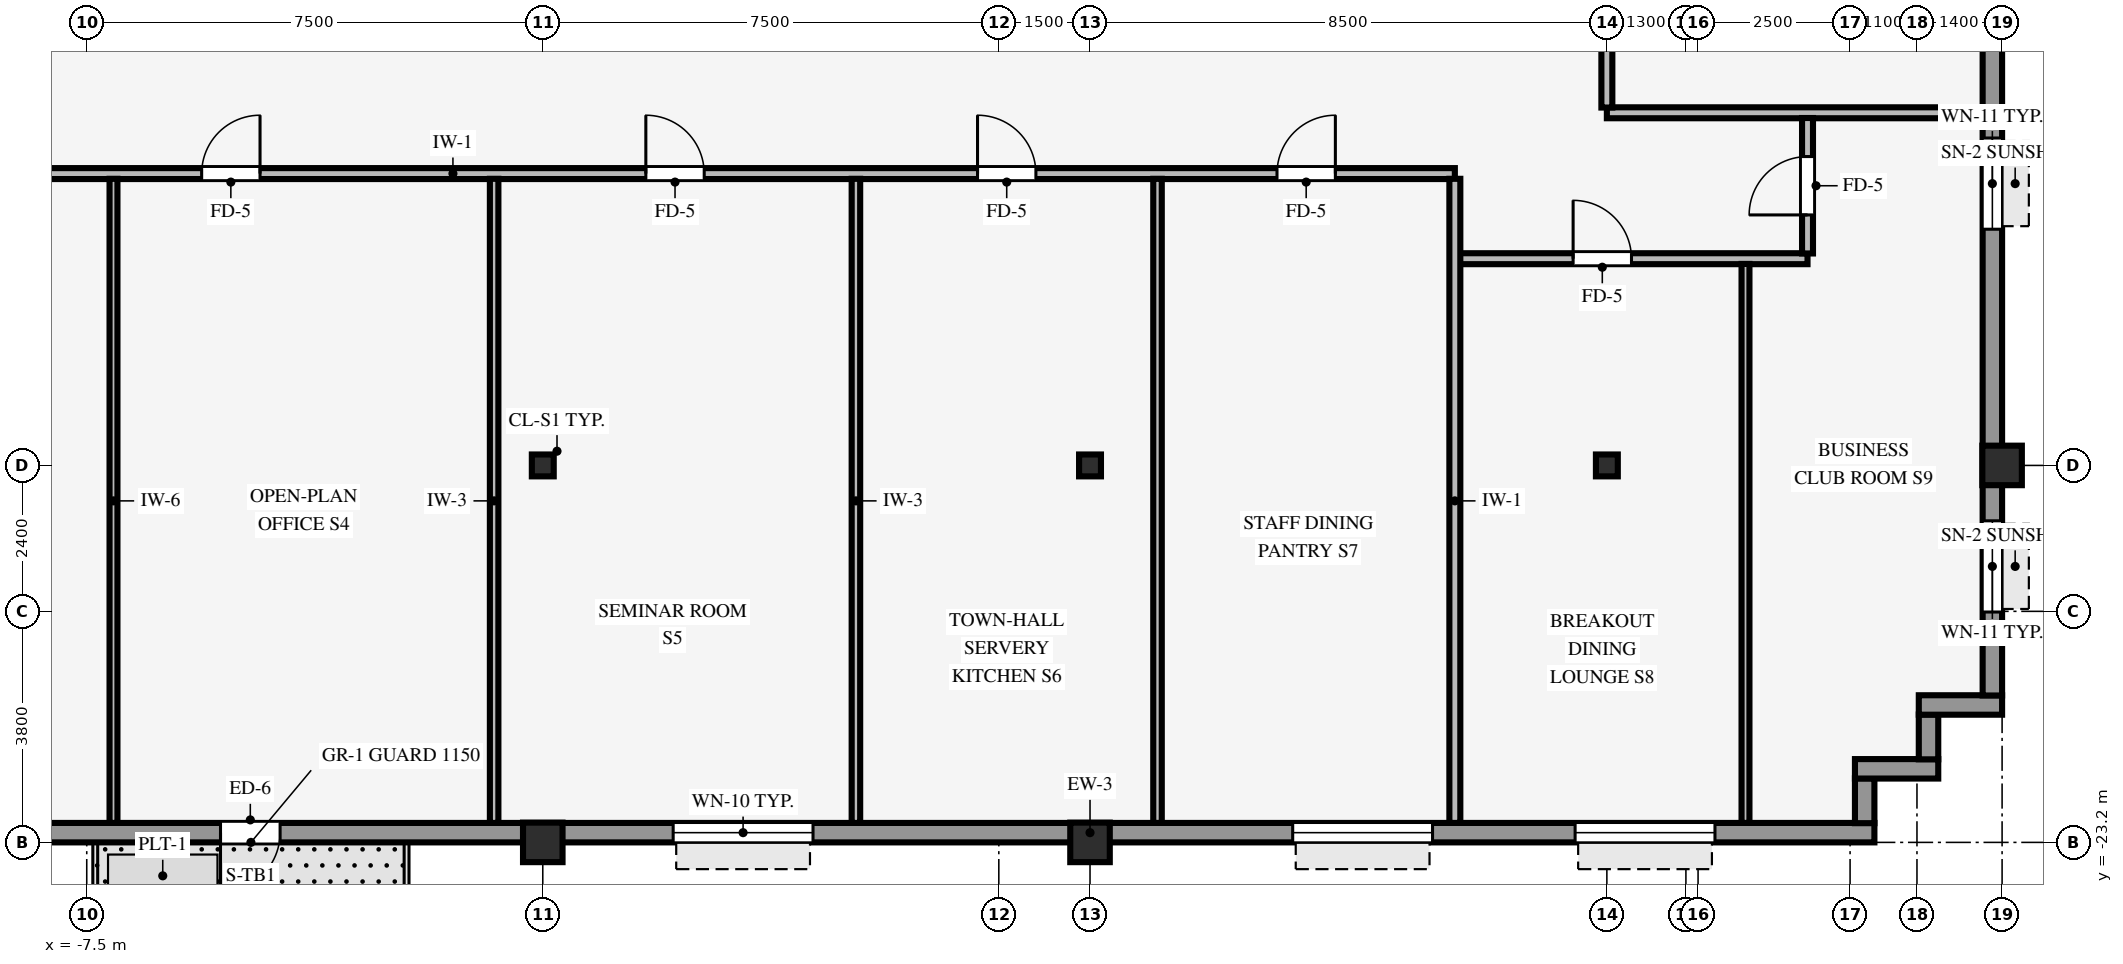
"""IFC4 building model, lengths in metres.
Left out: names, types, materials, properties, quantities, classifications, styles, units other than length and angle.
Written with IfcOpenShell. Run it as: python <this file> out.ifc"""

import sys

from ifc_helpers import new_model, si_unit, direction, frame, frame_2d, origin, origin_2d, place, context, subcontext, project, spatial, rectangle, hollow_rectangle, i_section, extrude, source, transform, mapped, element, fill, save


model = new_model("IFC4")
c1 = context("Model", 3, precision=1e-05, world=origin(), true_north=direction((0.0, 1.0)))
c2 = subcontext(c1, "Body", "Model", "MODEL_VIEW")
j1 = project(units=[si_unit("LENGTHUNIT", "METRE"), si_unit("PLANEANGLEUNIT", "RADIAN")], contexts=[c1])
p1 = place(None, origin())
s1 = spatial("IfcSite", under=j1, at=p1, CompositionType="ELEMENT")
p2 = place(p1, origin())
s2 = spatial("IfcBuilding", under=s1, at=p2, CompositionType="ELEMENT")
p3 = place(p2, frame((0.0, 0.0, 105.6)))
s3 = spatial("IfcBuildingStorey", under=s2, at=p3, CompositionType="ELEMENT", Elevation=105.6)
for number, where, z_axis, x_axis in (
    (1, (24.0, -17.0, 0.0), (0.0, 0.0, 1.0), (1.0, 0.0, 0.0)),
    (2, (0.0, -23.2, 0.0), (0.0, 0.0, 1.0), (1.0, 0.0, 0.0)),
    (3, (9.0, -23.2, 0.0), (0.0, 0.0, 1.0), (1.0, 0.0, 0.0)),
):
    element("IfcColumn", number, at=place(p3, frame(where, z_axis=z_axis, x_axis=x_axis)), inside=s3, PredefinedType="COLUMN", context=c2, shape_type="SweptSolid", body=[
        extrude(hollow_rectangle(XDim=0.65, YDim=0.65, WallThickness=0.04, InnerFilletRadius=0.04, OuterFilletRadius=0.08, at=origin_2d()), origin(), (0.0, 0.0, 1.0), 3.37),
    ])
for number, where, z_axis, x_axis in (
    (4, (0.0, -17.0, 0.0), (0.0, 0.0, 1.0), (1.0, 0.0, 0.0)),
    (5, (9.0, -17.0, 0.0), (0.0, 0.0, 1.0), (1.0, 0.0, 0.0)),
    (6, (17.5, -17.0, 0.0), (0.0, 0.0, 1.0), (1.0, 0.0, 0.0)),
):
    element("IfcColumn", number, at=place(p3, frame(where, z_axis=z_axis, x_axis=x_axis)), inside=s3, PredefinedType="COLUMN", context=c2, shape_type="SweptSolid", body=[
        extrude(i_section(OverallWidth=0.36, OverallDepth=0.36, WebThickness=0.021, FlangeThickness=0.021, FilletRadius=0.018, at=origin_2d()), origin(), (0.0, 0.0, 1.0), 3.37),
    ])
p4 = place(p3, frame((-21.9, -23.04, 0.0), z_axis=(0.0, 0.0, 1.0), x_axis=(1.0, 0.0, 0.0)))
e7 = element("IfcWall", 7, at=p4, inside=s3, PredefinedType="STANDARD", context=c2, shape_type="SweptSolid", body=[
    extrude(rectangle(XDim=43.8, YDim=0.32, at=frame_2d((21.9, 0.0))), origin(), (0.0, 0.0, 1.0), 2.705),
])
p5 = place(p4, frame((17.58, 0.0, 0.0), z_axis=(0.0, 0.0, 1.0), x_axis=(-1.0, 0.0, 0.0)))
e8 = element("IfcOpeningElement", 8, at=p5, cuts=e7, PredefinedType="OPENING", context=c2, shape_type="SweptSolid", body=[
    extrude(rectangle(XDim=0.98, YDim=2.15, at=frame_2d((0.49, 1.075))), frame((0.0, 0.17, 0.0), z_axis=(0.0, -1.0, 0.0), x_axis=(1.0, 0.0, 0.0)), (0.0, 0.0, 1.0), 0.34),
])
p6 = place(p4, frame((2.622, 0.0, 0.8)))
e9 = element("IfcOpeningElement", 9, at=p6, cuts=e7, PredefinedType="OPENING", context=c2, shape_type="SweptSolid", body=[
    extrude(rectangle(XDim=2.3, YDim=1.62, at=frame_2d((1.15, 0.81))), frame((0.0, 0.17, 0.0), z_axis=(0.0, -1.0, 0.0), x_axis=(1.0, 0.0, 0.0)), (0.0, 0.0, 1.0), 0.34),
])
p7 = place(p4, frame((8.167, 0.0, 0.8)))
e10 = element("IfcOpeningElement", 10, at=p7, cuts=e7, PredefinedType="OPENING", context=c2, shape_type="SweptSolid", body=[
    extrude(rectangle(XDim=2.3, YDim=1.62, at=frame_2d((1.15, 0.81))), frame((0.0, 0.17, 0.0), z_axis=(0.0, -1.0, 0.0), x_axis=(1.0, 0.0, 0.0)), (0.0, 0.0, 1.0), 0.34),
])
p8 = place(p4, frame((24.044, 0.0, 0.8)))
e11 = element("IfcOpeningElement", 11, at=p8, cuts=e7, PredefinedType="OPENING", context=c2, shape_type="SweptSolid", body=[
    extrude(rectangle(XDim=2.3, YDim=1.62, at=frame_2d((1.15, 0.81))), frame((0.0, 0.17, 0.0), z_axis=(0.0, -1.0, 0.0), x_axis=(1.0, 0.0, 0.0)), (0.0, 0.0, 1.0), 0.34),
])
p9 = place(p4, frame((34.233, 0.0, 0.8)))
e12 = element("IfcOpeningElement", 12, at=p9, cuts=e7, PredefinedType="OPENING", context=c2, shape_type="SweptSolid", body=[
    extrude(rectangle(XDim=2.3, YDim=1.62, at=frame_2d((1.15, 0.81))), frame((0.0, 0.17, 0.0), z_axis=(0.0, -1.0, 0.0), x_axis=(1.0, 0.0, 0.0)), (0.0, 0.0, 1.0), 0.34),
])
p10 = place(p4, frame((38.878, 0.0, 0.8)))
e13 = element("IfcOpeningElement", 13, at=p10, cuts=e7, PredefinedType="OPENING", context=c2, shape_type="SweptSolid", body=[
    extrude(rectangle(XDim=2.3, YDim=1.62, at=frame_2d((1.15, 0.81))), frame((0.0, 0.17, 0.0), z_axis=(0.0, -1.0, 0.0), x_axis=(1.0, 0.0, 0.0)), (0.0, 0.0, 1.0), 0.34),
])
p11 = place(p3, frame((21.74, -22.884, 0.0), z_axis=(0.0, 0.0, 1.0), x_axis=(0.0, 1.0, 0.0)))
e14 = element("IfcWall", 14, at=p11, inside=s3, PredefinedType="STANDARD", context=c2, shape_type="SweptSolid", body=[
    extrude(rectangle(XDim=0.738, YDim=0.32, at=frame_2d((0.369, 0.0))), origin(), (0.0, 0.0, 1.0), 3.36),
])
p12 = place(p3, frame((21.58, -21.99, 0.0), z_axis=(0.0, 0.0, 1.0), x_axis=(1.0, 0.0, 0.0)))
e15 = element("IfcWall", 15, at=p12, inside=s3, PredefinedType="STANDARD", context=c2, shape_type="SweptSolid", body=[
    extrude(rectangle(XDim=1.37, YDim=0.32, at=frame_2d((0.685, 0.0))), origin(), (0.0, 0.0, 1.0), 3.36),
])
p13 = place(p3, frame((22.79, -21.834, 0.0), z_axis=(0.0, 0.0, 1.0), x_axis=(0.0, 1.0, 0.0)))
e16 = element("IfcWall", 16, at=p13, inside=s3, PredefinedType="STANDARD", context=c2, shape_type="SweptSolid", body=[
    extrude(rectangle(XDim=0.738, YDim=0.32, at=frame_2d((0.369, 0.0))), origin(), (0.0, 0.0, 1.0), 3.36),
])
p14 = place(p3, frame((22.63, -20.94, 0.0), z_axis=(0.0, 0.0, 1.0), x_axis=(1.0, 0.0, 0.0)))
e17 = element("IfcWall", 17, at=p14, inside=s3, PredefinedType="STANDARD", context=c2, shape_type="SweptSolid", body=[
    extrude(rectangle(XDim=1.37, YDim=0.32, at=frame_2d((0.685, 0.0))), origin(), (0.0, 0.0, 1.0), 3.36),
])
p15 = place(p3, frame((23.84, -20.784, 0.0), z_axis=(0.0, 0.0, 1.0), x_axis=(0.0, 1.0, 0.0)))
e18 = element("IfcWall", 18, at=p15, inside=s3, PredefinedType="STANDARD", context=c2, shape_type="SweptSolid", body=[
    extrude(rectangle(XDim=41.568, YDim=0.32, at=frame_2d((20.784, 0.0))), origin(), (0.0, 0.0, 1.0), 2.705),
])
p16 = place(p15, frame((1.373, 0.0, 0.8)))
e19 = element("IfcOpeningElement", 19, at=p16, cuts=e18, PredefinedType="OPENING", context=c2, shape_type="SweptSolid", body=[
    extrude(rectangle(XDim=1.5, YDim=1.6, at=frame_2d((0.75, 0.8))), frame((0.0, 0.17, 0.0), z_axis=(0.0, -1.0, 0.0), x_axis=(1.0, 0.0, 0.0)), (0.0, 0.0, 1.0), 0.34),
])
p17 = place(p15, frame((7.669, 0.0, 0.8)))
e20 = element("IfcOpeningElement", 20, at=p17, cuts=e18, PredefinedType="OPENING", context=c2, shape_type="SweptSolid", body=[
    extrude(rectangle(XDim=1.5, YDim=1.6, at=frame_2d((0.75, 0.8))), frame((0.0, 0.17, 0.0), z_axis=(0.0, -1.0, 0.0), x_axis=(1.0, 0.0, 0.0)), (0.0, 0.0, 1.0), 0.34),
])
p18 = place(p15, frame((12.615, 0.0, 0.8)))
e21 = element("IfcOpeningElement", 21, at=p18, cuts=e18, PredefinedType="OPENING", context=c2, shape_type="SweptSolid", body=[
    extrude(rectangle(XDim=1.5, YDim=1.6, at=frame_2d((0.75, 0.8))), frame((0.0, 0.17, 0.0), z_axis=(0.0, -1.0, 0.0), x_axis=(1.0, 0.0, 0.0)), (0.0, 0.0, 1.0), 0.34),
])
p19 = place(p15, frame((17.561, 0.0, 0.8)))
e22 = element("IfcOpeningElement", 22, at=p19, cuts=e18, PredefinedType="OPENING", context=c2, shape_type="SweptSolid", body=[
    extrude(rectangle(XDim=1.5, YDim=1.6, at=frame_2d((0.75, 0.8))), frame((0.0, 0.17, 0.0), z_axis=(0.0, -1.0, 0.0), x_axis=(1.0, 0.0, 0.0)), (0.0, 0.0, 1.0), 0.34),
])
p20 = place(p15, frame((22.507, 0.0, 0.8)))
e23 = element("IfcOpeningElement", 23, at=p20, cuts=e18, PredefinedType="OPENING", context=c2, shape_type="SweptSolid", body=[
    extrude(rectangle(XDim=1.5, YDim=1.6, at=frame_2d((0.75, 0.8))), frame((0.0, 0.17, 0.0), z_axis=(0.0, -1.0, 0.0), x_axis=(1.0, 0.0, 0.0)), (0.0, 0.0, 1.0), 0.34),
])
p21 = place(p15, frame((27.453, 0.0, 0.8)))
e24 = element("IfcOpeningElement", 24, at=p21, cuts=e18, PredefinedType="OPENING", context=c2, shape_type="SweptSolid", body=[
    extrude(rectangle(XDim=1.5, YDim=1.6, at=frame_2d((0.75, 0.8))), frame((0.0, 0.17, 0.0), z_axis=(0.0, -1.0, 0.0), x_axis=(1.0, 0.0, 0.0)), (0.0, 0.0, 1.0), 0.34),
])
p22 = place(p15, frame((32.399, 0.0, 0.8)))
e25 = element("IfcOpeningElement", 25, at=p22, cuts=e18, PredefinedType="OPENING", context=c2, shape_type="SweptSolid", body=[
    extrude(rectangle(XDim=1.5, YDim=1.6, at=frame_2d((0.75, 0.8))), frame((0.0, 0.17, 0.0), z_axis=(0.0, -1.0, 0.0), x_axis=(1.0, 0.0, 0.0)), (0.0, 0.0, 1.0), 0.34),
])
p23 = place(p15, frame((38.695, 0.0, 0.8)))
e26 = element("IfcOpeningElement", 26, at=p23, cuts=e18, PredefinedType="OPENING", context=c2, shape_type="SweptSolid", body=[
    extrude(rectangle(XDim=1.5, YDim=1.6, at=frame_2d((0.75, 0.8))), frame((0.0, 0.17, 0.0), z_axis=(0.0, -1.0, 0.0), x_axis=(1.0, 0.0, 0.0)), (0.0, 0.0, 1.0), 0.34),
])
p24 = place(p3, frame((15.07, -13.6, 0.0), z_axis=(0.0, 0.0, 1.0), x_axis=(1.0, 0.0, 0.0)))
e27 = element("IfcWall", 27, at=p24, inside=s3, PredefinedType="PARTITIONING", context=c2, shape_type="SweptSolid", body=[
    extrude(rectangle(XDim=5.73, YDim=0.18, at=frame_2d((2.865, 0.0))), origin(), (0.0, 0.0, 1.0), 2.998),
])
p25 = place(p24, frame((1.875, 0.0, 0.0)))
e28 = element("IfcOpeningElement", 28, at=p25, cuts=e27, PredefinedType="OPENING", context=c2, shape_type="SweptSolid", body=[
    extrude(rectangle(XDim=0.96, YDim=2.1, at=frame_2d((0.48, 1.05))), frame((0.0, 0.1, 0.0), z_axis=(0.0, -1.0, 0.0), x_axis=(1.0, 0.0, 0.0)), (0.0, 0.0, 1.0), 0.2),
])
p26 = place(p3, frame((-15.0, -12.2, 0.0), z_axis=(0.0, 0.0, 1.0), x_axis=(1.0, 0.0, 0.0)))
e29 = element("IfcWall", 29, at=p26, inside=s3, PredefinedType="PARTITIONING", context=c2, shape_type="SweptSolid", body=[
    extrude(rectangle(XDim=30.0, YDim=0.18, at=frame_2d((15.0, 0.0))), origin(), (0.0, 0.0, 1.0), 3.36),
])
p27 = place(p26, frame((3.98, 0.0, 0.0)))
e30 = element("IfcOpeningElement", 30, at=p27, cuts=e29, PredefinedType="OPENING", context=c2, shape_type="SweptSolid", body=[
    extrude(rectangle(XDim=0.96, YDim=2.1, at=frame_2d((0.48, 1.05))), frame((0.0, 0.1, 0.0), z_axis=(0.0, -1.0, 0.0), x_axis=(1.0, 0.0, 0.0)), (0.0, 0.0, 1.0), 0.2),
])
p28 = place(p26, frame((16.695, 0.0, 0.0)))
e31 = element("IfcOpeningElement", 31, at=p28, cuts=e29, PredefinedType="OPENING", context=c2, shape_type="SweptSolid", body=[
    extrude(rectangle(XDim=0.96, YDim=2.1, at=frame_2d((0.48, 1.05))), frame((0.0, 0.1, 0.0), z_axis=(0.0, -1.0, 0.0), x_axis=(1.0, 0.0, 0.0)), (0.0, 0.0, 1.0), 0.2),
])
p29 = place(p26, frame((22.15, 0.0, 0.0)))
e32 = element("IfcOpeningElement", 32, at=p29, cuts=e29, PredefinedType="OPENING", context=c2, shape_type="SweptSolid", body=[
    extrude(rectangle(XDim=0.96, YDim=2.1, at=frame_2d((0.48, 1.05))), frame((0.0, 0.1, 0.0), z_axis=(0.0, -1.0, 0.0), x_axis=(1.0, 0.0, 0.0)), (0.0, 0.0, 1.0), 0.2),
])
p30 = place(p26, frame((27.075, 0.0, 0.0)))
e33 = element("IfcOpeningElement", 33, at=p30, cuts=e29, PredefinedType="OPENING", context=c2, shape_type="SweptSolid", body=[
    extrude(rectangle(XDim=0.96, YDim=2.1, at=frame_2d((0.48, 1.05))), frame((0.0, 0.1, 0.0), z_axis=(0.0, -1.0, 0.0), x_axis=(1.0, 0.0, 0.0)), (0.0, 0.0, 1.0), 0.2),
])
p31 = place(p26, frame((9.39, 0.0, 0.0)))
e34 = element("IfcOpeningElement", 34, at=p31, cuts=e29, PredefinedType="OPENING", context=c2, shape_type="SweptSolid", body=[
    extrude(rectangle(XDim=0.96, YDim=2.1, at=frame_2d((0.48, 1.05))), frame((0.0, 0.1, 0.0), z_axis=(0.0, -1.0, 0.0), x_axis=(1.0, 0.0, 0.0)), (0.0, 0.0, 1.0), 0.2),
])
p32 = place(p3, frame((17.5, -11.2, 0.0), z_axis=(0.0, 0.0, 1.0), x_axis=(1.0, 0.0, 0.0)))
e35 = element("IfcWall", 35, at=p32, inside=s3, PredefinedType="PARTITIONING", context=c2, shape_type="SweptSolid", body=[
    extrude(rectangle(XDim=6.18, YDim=0.18, at=frame_2d((3.09, 0.0))), origin(), (0.0, 0.0, 1.0), 3.36),
])
p33 = place(p3, frame((-7.06, -22.88, 0.0), z_axis=(0.0, 0.0, 1.0), x_axis=(0.0, 1.0, 0.0)))
e36 = element("IfcWall", 36, at=p33, inside=s3, PredefinedType="PARTITIONING", context=c2, shape_type="SweptSolid", body=[
    extrude(rectangle(XDim=10.594, YDim=0.13, at=frame_2d((5.297, 0.0))), origin(), (0.0, 0.0, 1.0), 3.36),
])
for number, where, z_axis, x_axis in (
    (37, (-0.8, -22.88, 0.0), (0.0, 0.0, 1.0), (0.0, 1.0, 0.0)),
    (38, (5.15, -22.88, 0.0), (0.0, 0.0, 1.0), (0.0, 1.0, 0.0)),
    (39, (10.11, -22.88, 0.0), (0.0, 0.0, 1.0), (0.0, 1.0, 0.0)),
):
    element("IfcWall", number, at=place(p3, frame(where, z_axis=z_axis, x_axis=x_axis)), inside=s3, PredefinedType="PARTITIONING", context=c2, shape_type="SweptSolid", body=[
        extrude(rectangle(XDim=10.594, YDim=0.14, at=frame_2d((5.297, 0.0))), origin(), (0.0, 0.0, 1.0), 3.36),
    ])
p34 = place(p3, frame((15.0, -22.88, 0.0), z_axis=(0.0, 0.0, 1.0), x_axis=(0.0, 1.0, 0.0)))
e40 = element("IfcWall", 40, at=p34, inside=s3, PredefinedType="PARTITIONING", context=c2, shape_type="SweptSolid", body=[
    extrude(rectangle(XDim=10.594, YDim=0.18, at=frame_2d((5.297, 0.0))), origin(), (0.0, 0.0, 1.0), 3.36),
])
p35 = place(p3, frame((17.5, -11.114, 0.0), z_axis=(0.0, 0.0, 1.0), x_axis=(0.0, 1.0, 0.0)))
e41 = element("IfcWall", 41, at=p35, inside=s3, PredefinedType="PARTITIONING", context=c2, shape_type="SweptSolid", body=[
    extrude(rectangle(XDim=0.968, YDim=0.18, at=frame_2d((0.484, 0.0))), origin(), (0.0, 0.0, 1.0), 2.738),
])
p36 = place(p3, frame((19.78, -22.88, 0.0), z_axis=(0.0, 0.0, 1.0), x_axis=(0.0, 1.0, 0.0)))
e42 = element("IfcWall", 42, at=p36, inside=s3, PredefinedType="PARTITIONING", context=c2, shape_type="SweptSolid", body=[
    extrude(rectangle(XDim=9.194, YDim=0.13, at=frame_2d((4.597, 0.0))), origin(), (0.0, 0.0, 1.0), 3.36),
])
p37 = place(p3, frame((20.8, -13.514, 0.0), z_axis=(0.0, 0.0, 1.0), x_axis=(0.0, 1.0, 0.0)))
e43 = element("IfcWall", 43, at=p37, inside=s3, PredefinedType="PARTITIONING", context=c2, shape_type="SweptSolid", body=[
    extrude(rectangle(XDim=2.228, YDim=0.18, at=frame_2d((1.114, 0.0))), origin(), (0.0, 0.0, 1.0), 3.36),
])
p38 = place(p37, frame((0.634, 0.0, 0.0)))
e44 = element("IfcOpeningElement", 44, at=p38, cuts=e43, PredefinedType="OPENING", context=c2, shape_type="SweptSolid", body=[
    extrude(rectangle(XDim=0.96, YDim=2.1, at=frame_2d((0.48, 1.05))), frame((0.0, 0.1, 0.0), z_axis=(0.0, -1.0, 0.0), x_axis=(1.0, 0.0, 0.0)), (0.0, 0.0, 1.0), 0.2),
])
m1 = source(origin(), c2, "Body", "SweptSolid", [
    extrude(rectangle(XDim=0.98, YDim=2.15, at=frame_2d((0.49, 1.075))), frame((0.0, 0.025, 0.0), z_axis=(0.0, -1.0, 0.0), x_axis=(1.0, 0.0, 0.0)), (0.0, 0.0, 1.0), 0.05),
])
p39 = place(p5, origin())
e45 = element("IfcDoor", 45, at=p39, inside=s3, OperationType="SINGLE_SWING_RIGHT", PredefinedType="DOOR", context=c2, shape_type="MappedRepresentation", body=[
    mapped(m1, transform((0.0, 0.0, 0.0), scale=1.0)),
])
fill(e8, e45)
m2 = source(origin(), c2, "Body", "SweptSolid", [
    extrude(rectangle(XDim=2.3, YDim=1.62, at=frame_2d((1.15, 0.81))), frame((0.0, 0.03, 0.0), z_axis=(0.0, -1.0, 0.0), x_axis=(1.0, 0.0, 0.0)), (0.0, 0.0, 1.0), 0.06),
])
p40 = place(p8, origin())
e46 = element("IfcWindow", 46, at=p40, inside=s3, PartitioningType="SINGLE_PANEL", PredefinedType="WINDOW", context=c2, shape_type="MappedRepresentation", body=[
    mapped(m2, transform((0.0, 0.0, 0.0), scale=1.0)),
])
fill(e11, e46)
p41 = place(p9, origin())
e47 = element("IfcWindow", 47, at=p41, inside=s3, PartitioningType="SINGLE_PANEL", PredefinedType="WINDOW", context=c2, shape_type="MappedRepresentation", body=[
    mapped(m2, transform((0.0, 0.0, 0.0), scale=1.0)),
])
fill(e12, e47)
p42 = place(p10, origin())
e48 = element("IfcWindow", 48, at=p42, inside=s3, PartitioningType="SINGLE_PANEL", PredefinedType="WINDOW", context=c2, shape_type="MappedRepresentation", body=[
    mapped(m2, transform((0.0, 0.0, 0.0), scale=1.0)),
])
fill(e13, e48)
m3 = source(origin(), c2, "Body", "SweptSolid", [
    extrude(rectangle(XDim=1.5, YDim=1.6, at=frame_2d((0.75, 0.8))), frame((0.0, 0.03, 0.0), z_axis=(0.0, -1.0, 0.0), x_axis=(1.0, 0.0, 0.0)), (0.0, 0.0, 1.0), 0.06),
])
p43 = place(p16, origin())
e49 = element("IfcWindow", 49, at=p43, inside=s3, PartitioningType="SINGLE_PANEL", PredefinedType="WINDOW", context=c2, shape_type="MappedRepresentation", body=[
    mapped(m3, transform((0.0, 0.0, 0.0), scale=1.0)),
])
fill(e19, e49)
p44 = place(p17, origin())
e50 = element("IfcWindow", 50, at=p44, inside=s3, PartitioningType="SINGLE_PANEL", PredefinedType="WINDOW", context=c2, shape_type="MappedRepresentation", body=[
    mapped(m3, transform((0.0, 0.0, 0.0), scale=1.0)),
])
fill(e20, e50)
m4 = source(origin(), c2, "Body", "SweptSolid", [
    extrude(rectangle(XDim=0.96, YDim=2.1, at=frame_2d((0.48, 1.05))), frame((0.0, 0.025, 0.0), z_axis=(0.0, -1.0, 0.0), x_axis=(1.0, 0.0, 0.0)), (0.0, 0.0, 1.0), 0.05),
])
p45 = place(p28, origin())
e51 = element("IfcDoor", 51, at=p45, inside=s3, OperationType="SINGLE_SWING_LEFT", PredefinedType="DOOR", context=c2, shape_type="MappedRepresentation", body=[
    mapped(m4, transform((0.0, 0.0, 0.0), scale=1.0)),
])
fill(e31, e51)
p46 = place(p29, origin())
e52 = element("IfcDoor", 52, at=p46, inside=s3, OperationType="SINGLE_SWING_LEFT", PredefinedType="DOOR", context=c2, shape_type="MappedRepresentation", body=[
    mapped(m4, transform((0.0, 0.0, 0.0), scale=1.0)),
])
fill(e32, e52)
p47 = place(p30, origin())
e53 = element("IfcDoor", 53, at=p47, inside=s3, OperationType="SINGLE_SWING_RIGHT", PredefinedType="DOOR", context=c2, shape_type="MappedRepresentation", body=[
    mapped(m4, transform((0.0, 0.0, 0.0), scale=1.0)),
])
fill(e33, e53)
p48 = place(p25, origin())
e54 = element("IfcDoor", 54, at=p48, inside=s3, OperationType="SINGLE_SWING_LEFT", PredefinedType="DOOR", context=c2, shape_type="MappedRepresentation", body=[
    mapped(m4, transform((0.0, 0.0, 0.0), scale=1.0)),
])
fill(e28, e54)
p49 = place(p31, origin())
e55 = element("IfcDoor", 55, at=p49, inside=s3, OperationType="SINGLE_SWING_RIGHT", PredefinedType="DOOR", context=c2, shape_type="MappedRepresentation", body=[
    mapped(m4, transform((0.0, 0.0, 0.0), scale=1.0)),
])
fill(e34, e55)
p50 = place(p38, origin())
e56 = element("IfcDoor", 56, at=p50, inside=s3, OperationType="SINGLE_SWING_LEFT", PredefinedType="DOOR", context=c2, shape_type="MappedRepresentation", body=[
    mapped(m4, transform((0.0, 0.0, 0.0), scale=1.0)),
])
fill(e44, e56)
save(model, sys.argv[1])
